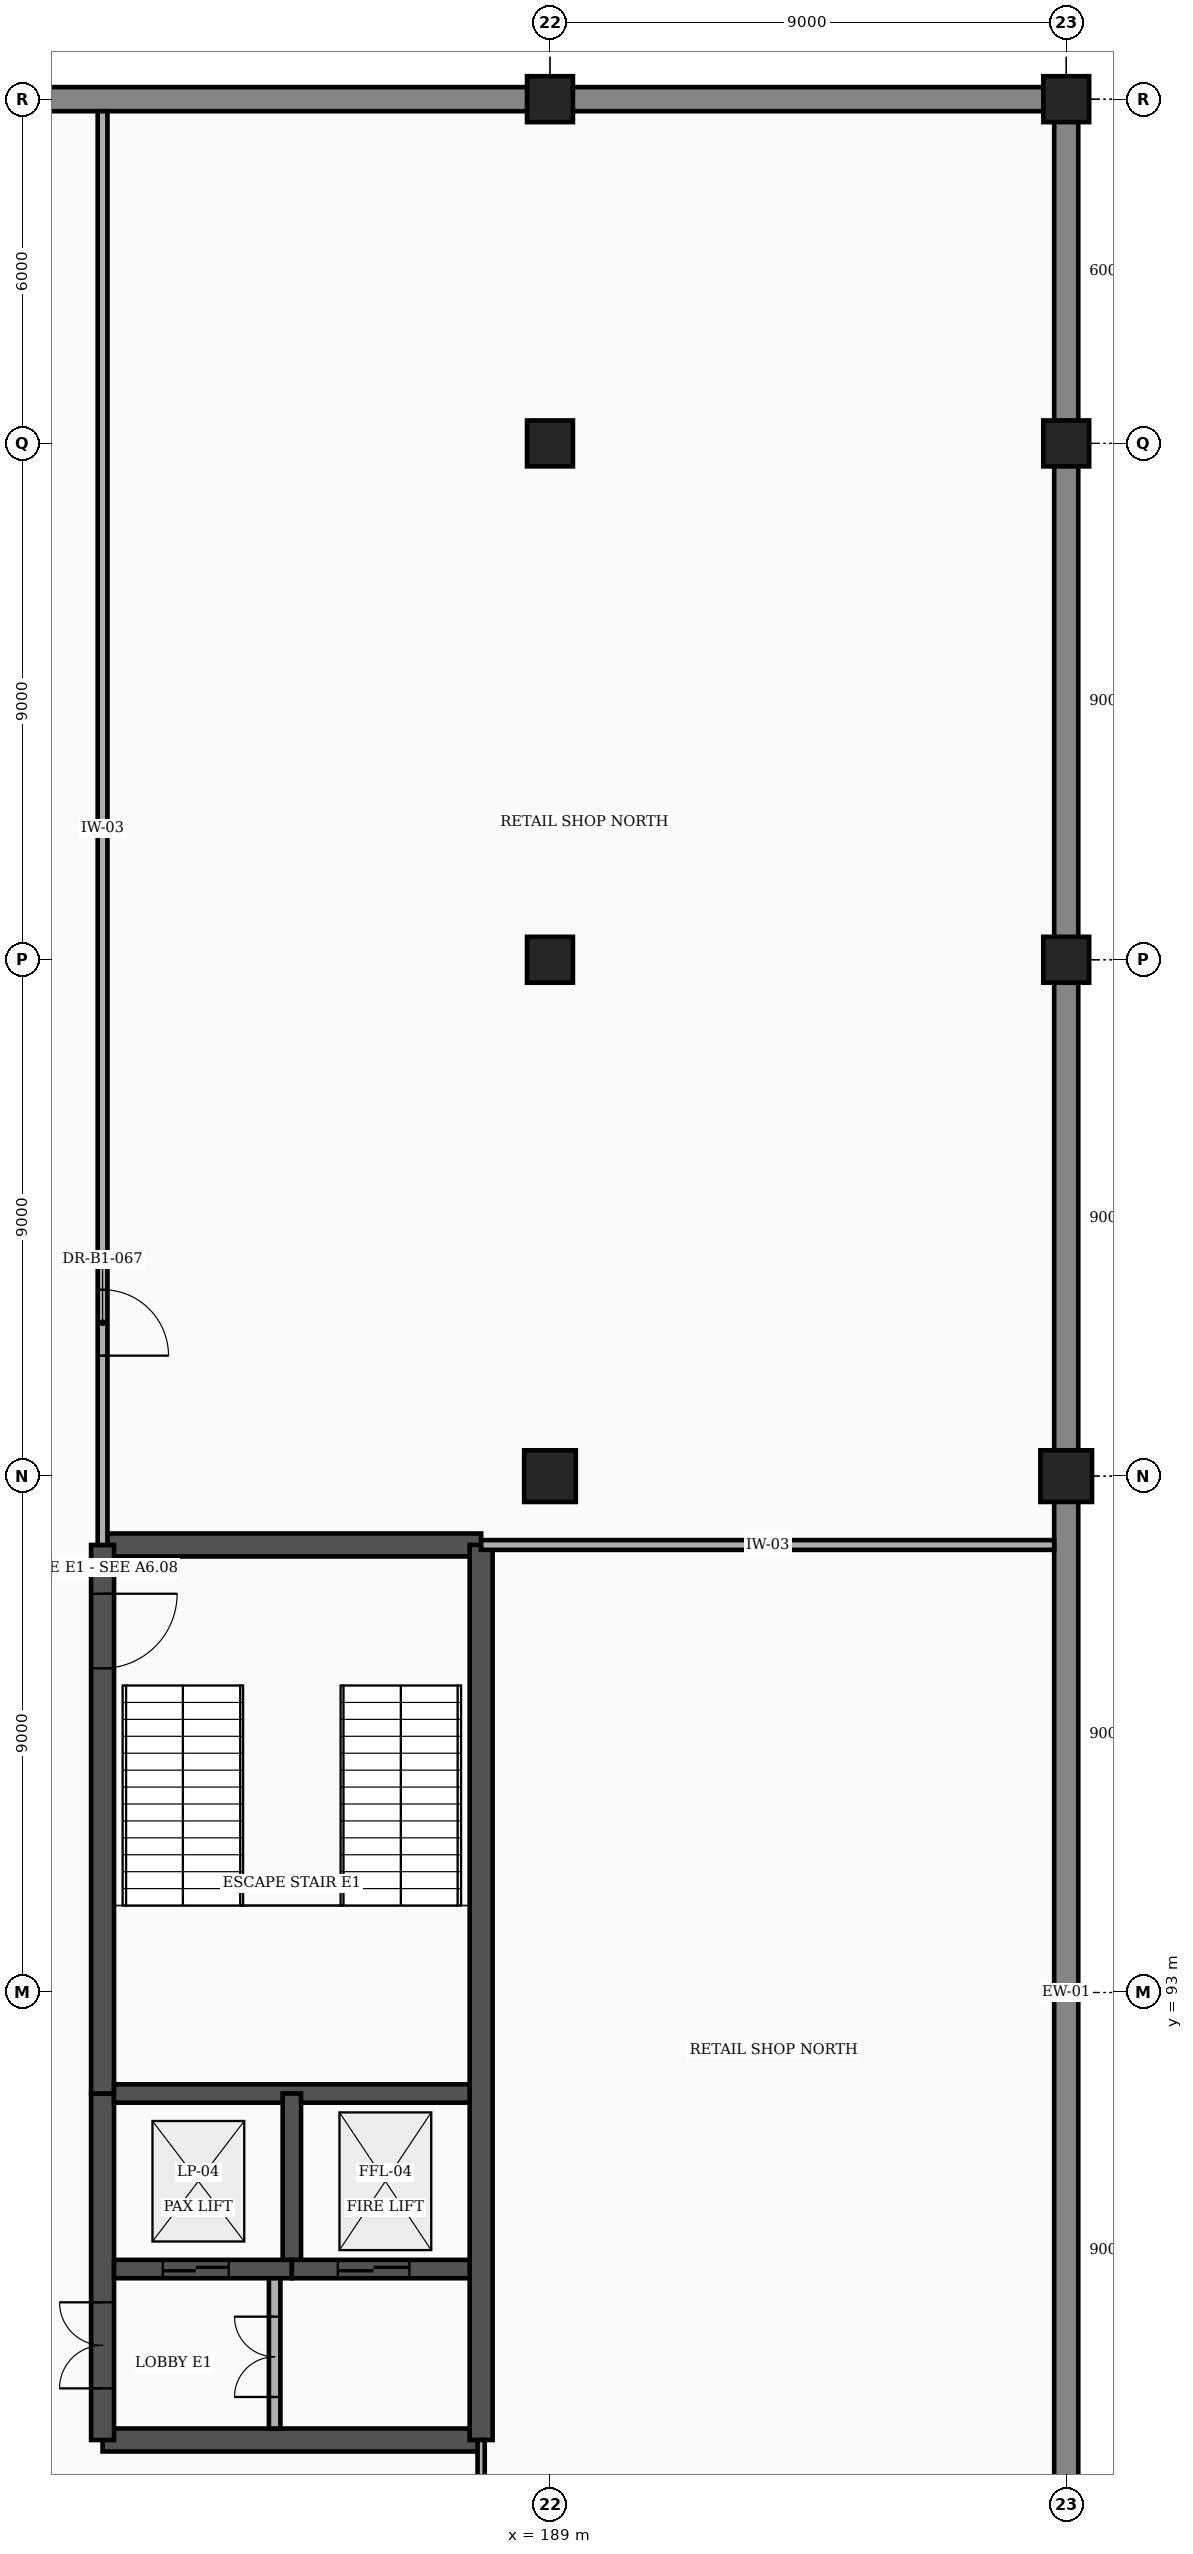
"""IFC4 building model, lengths in metres.
Left out: names, types, materials, properties, quantities, classifications, styles, units other than length and angle.
Written with IfcOpenShell. Run it as: python <this file> out.ifc"""

import sys

from ifc_helpers import new_model, si_unit, direction, frame, frame_2d, origin, origin_2d, place, context, subcontext, project, spatial, rectangle, extrude, element, fill, save


model = new_model("IFC4")
c1 = context("Model", 3, precision=1e-05, world=origin(), true_north=direction((0.0, 1.0)))
c2 = subcontext(c1, "Body", "Model", "MODEL_VIEW")
j1 = project(units=[si_unit("LENGTHUNIT", "METRE"), si_unit("PLANEANGLEUNIT", "RADIAN")], contexts=[c1])
p1 = place(None, origin())
s1 = spatial("IfcSite", under=j1, at=p1, CompositionType="ELEMENT")
p2 = place(p1, origin())
s2 = spatial("IfcBuilding", under=s1, at=p2, CompositionType="ELEMENT")
p3 = place(p2, frame((0.0, 0.0, -4.5)))
s3 = spatial("IfcBuildingStorey", under=s2, at=p3, CompositionType="ELEMENT", Elevation=-4.5)
p4 = place(p3, frame((189.0, 102.0, -0.45), z_axis=(0.0, 0.0, 1.0), x_axis=(1.0, 0.0, 0.0)))
e1 = element("IfcColumn", 1, at=p4, inside=s3, PredefinedType="COLUMN", context=c2, shape_type="SweptSolid", body=[
    extrude(rectangle(XDim=0.9, YDim=0.9, at=origin_2d()), origin(), (0.0, 0.0, 1.0), 4.95),
])
for number, where, z_axis, x_axis in (
    (2, (189.0, 111.0, -0.45), (0.0, 0.0, 1.0), (1.0, 0.0, 0.0)),
    (3, (189.0, 120.0, -0.45), (0.0, 0.0, 1.0), (1.0, 0.0, 0.0)),
    (4, (189.0, 126.0, -0.45), (0.0, 0.0, 1.0), (1.0, 0.0, 0.0)),
):
    element("IfcColumn", number, at=place(p3, frame(where, z_axis=z_axis, x_axis=x_axis)), inside=s3, PredefinedType="COLUMN", context=c2, shape_type="SweptSolid", body=[
        extrude(rectangle(XDim=0.8, YDim=0.8, at=origin_2d()), origin(), (0.0, 0.0, 1.0), 4.95),
    ])
p5 = place(p3, frame((198.0, 102.0, -0.45), z_axis=(0.0, 0.0, 1.0), x_axis=(1.0, 0.0, 0.0)))
e5 = element("IfcColumn", 5, at=p5, inside=s3, PredefinedType="COLUMN", context=c2, shape_type="SweptSolid", body=[
    extrude(rectangle(XDim=0.9, YDim=0.9, at=origin_2d()), origin(), (0.0, 0.0, 1.0), 4.95),
])
for number, where, z_axis, x_axis in (
    (6, (198.0, 111.0, -0.45), (0.0, 0.0, 1.0), (1.0, 0.0, 0.0)),
    (7, (198.0, 120.0, -0.45), (0.0, 0.0, 1.0), (1.0, 0.0, 0.0)),
    (8, (198.0, 126.0, -0.45), (0.0, 0.0, 1.0), (1.0, 0.0, 0.0)),
):
    element("IfcColumn", number, at=place(p3, frame(where, z_axis=z_axis, x_axis=x_axis)), inside=s3, PredefinedType="COLUMN", context=c2, shape_type="SweptSolid", body=[
        extrude(rectangle(XDim=0.8, YDim=0.8, at=origin_2d()), origin(), (0.0, 0.0, 1.0), 4.95),
    ])
p6 = place(p3, frame((171.392, 126.0, 0.0), z_axis=(0.0, 0.0, 1.0), x_axis=(1.0, 0.0, 0.0)))
e9 = element("IfcWall", 9, at=p6, inside=s3, PredefinedType="STANDARD", context=c2, shape_type="SweptSolid", body=[
    extrude(rectangle(XDim=17.216, YDim=0.42, at=frame_2d((8.608, 0.0))), origin(), (0.0, 0.0, 1.0), 3.7),
])
p7 = place(p3, frame((189.392, 126.0, 0.0), z_axis=(0.0, 0.0, 1.0), x_axis=(1.0, 0.0, 0.0)))
e10 = element("IfcWall", 10, at=p7, inside=s3, PredefinedType="STANDARD", context=c2, shape_type="SweptSolid", body=[
    extrude(rectangle(XDim=8.216, YDim=0.42, at=frame_2d((4.108, 0.0))), origin(), (0.0, 0.0, 1.0), 3.7),
])
p8 = place(p3, frame((198.0, 84.442, 0.0), z_axis=(0.0, 0.0, 1.0), x_axis=(0.0, 1.0, 0.0)))
e11 = element("IfcWall", 11, at=p8, inside=s3, PredefinedType="STANDARD", context=c2, shape_type="SweptSolid", body=[
    extrude(rectangle(XDim=17.116, YDim=0.42, at=frame_2d((8.558, 0.0))), origin(), (0.0, 0.0, 1.0), 3.7),
])
p9 = place(p3, frame((198.0, 102.442, 0.0), z_axis=(0.0, 0.0, 1.0), x_axis=(0.0, 1.0, 0.0)))
e12 = element("IfcWall", 12, at=p9, inside=s3, PredefinedType="STANDARD", context=c2, shape_type="SweptSolid", body=[
    extrude(rectangle(XDim=8.166, YDim=0.42, at=frame_2d((4.083, 0.0))), origin(), (0.0, 0.0, 1.0), 3.7),
])
p10 = place(p3, frame((198.0, 111.392, 0.0), z_axis=(0.0, 0.0, 1.0), x_axis=(0.0, 1.0, 0.0)))
e13 = element("IfcWall", 13, at=p10, inside=s3, PredefinedType="STANDARD", context=c2, shape_type="SweptSolid", body=[
    extrude(rectangle(XDim=8.216, YDim=0.42, at=frame_2d((4.108, 0.0))), origin(), (0.0, 0.0, 1.0), 3.7),
])
p11 = place(p3, frame((198.0, 120.392, 0.0), z_axis=(0.0, 0.0, 1.0), x_axis=(0.0, 1.0, 0.0)))
e14 = element("IfcWall", 14, at=p11, inside=s3, PredefinedType="STANDARD", context=c2, shape_type="SweptSolid", body=[
    extrude(rectangle(XDim=5.216, YDim=0.42, at=frame_2d((2.608, 0.0))), origin(), (0.0, 0.0, 1.0), 3.7),
])
for number, where, z_axis, x_axis in (
    (15, (181.2, 85.2, 0.0), (0.0, 0.0, 1.0), (1.0, 0.0, 0.0)),
    (16, (181.2, 100.8, 0.0), (0.0, 0.0, 1.0), (1.0, 0.0, 0.0)),
):
    element("IfcWall", number, at=place(p3, frame(where, z_axis=z_axis, x_axis=x_axis)), inside=s3, PredefinedType="SHEAR", context=c2, shape_type="SweptSolid", body=[
        extrude(rectangle(XDim=6.6, YDim=0.4, at=frame_2d((3.3, 0.0))), origin(), (0.0, 0.0, 1.0), 4.24),
    ])
p12 = place(p3, frame((187.8, 85.2, 0.0), z_axis=(0.0, 0.0, 1.0), x_axis=(0.0, 1.0, 0.0)))
e17 = element("IfcWall", 17, at=p12, inside=s3, PredefinedType="SHEAR", context=c2, shape_type="SweptSolid", body=[
    extrude(rectangle(XDim=15.6, YDim=0.4, at=frame_2d((7.8, 0.0))), origin(), (0.0, 0.0, 1.0), 4.24),
])
p13 = place(p3, frame((181.2, 85.2, 0.0), z_axis=(0.0, 0.0, 1.0), x_axis=(0.0, 1.0, 0.0)))
e18 = element("IfcWall", 18, at=p13, inside=s3, PredefinedType="SHEAR", context=c2, shape_type="SweptSolid", body=[
    extrude(rectangle(XDim=6.04, YDim=0.4, at=frame_2d((3.02, 0.0))), origin(), (0.0, 0.0, 1.0), 4.24),
])
p14 = place(p13, frame((0.9, 0.0, 0.0)))
e19 = element("IfcOpeningElement", 19, at=p14, cuts=e18, PredefinedType="OPENING", context=c2, shape_type="SweptSolid", body=[
    extrude(rectangle(XDim=1.5, YDim=2.2, at=frame_2d((0.75, 1.1))), frame((0.0, 0.212, 0.0), z_axis=(0.0, -1.0, 0.0), x_axis=(1.0, 0.0, 0.0)), (0.0, 0.0, 1.0), 0.424),
])
p15 = place(p3, frame((181.2, 91.24, 0.0), z_axis=(0.0, 0.0, 1.0), x_axis=(0.0, 1.0, 0.0)))
e20 = element("IfcWall", 20, at=p15, inside=s3, PredefinedType="SHEAR", context=c2, shape_type="SweptSolid", body=[
    extrude(rectangle(XDim=9.56, YDim=0.4, at=frame_2d((4.78, 0.0))), origin(), (0.0, 0.0, 1.0), 4.24),
])
p16 = place(p15, frame((7.41, 0.0, 0.0)))
e21 = element("IfcOpeningElement", 21, at=p16, cuts=e20, PredefinedType="OPENING", context=c2, shape_type="SweptSolid", body=[
    extrude(rectangle(XDim=1.3, YDim=2.2, at=frame_2d((0.65, 1.1))), frame((0.0, 0.212, 0.0), z_axis=(0.0, -1.0, 0.0), x_axis=(1.0, 0.0, 0.0)), (0.0, 0.0, 1.0), 0.424),
])
p17 = place(p3, frame((181.4, 91.24, 0.0), z_axis=(0.0, 0.0, 1.0), x_axis=(1.0, 0.0, 0.0)))
e22 = element("IfcWall", 22, at=p17, inside=s3, PredefinedType="SHEAR", context=c2, shape_type="SweptSolid", body=[
    extrude(rectangle(XDim=6.2, YDim=0.32, at=frame_2d((3.1, 0.0))), origin(), (0.0, 0.0, 1.0), 4.24),
])
p18 = place(p3, frame((184.5, 88.18, 0.0), z_axis=(0.0, 0.0, 1.0), x_axis=(0.0, 1.0, 0.0)))
e23 = element("IfcWall", 23, at=p18, inside=s3, PredefinedType="SHEAR", context=c2, shape_type="SweptSolid", body=[
    extrude(rectangle(XDim=3.06, YDim=0.32, at=frame_2d((1.53, 0.0))), origin(), (0.0, 0.0, 1.0), 4.24),
])
p19 = place(p3, frame((184.2, 85.4, 0.0), z_axis=(0.0, 0.0, 1.0), x_axis=(0.0, 1.0, 0.0)))
e24 = element("IfcWall", 24, at=p19, inside=s3, PredefinedType="PARTITIONING", context=c2, shape_type="SweptSolid", body=[
    extrude(rectangle(XDim=2.78, YDim=0.2, at=frame_2d((1.39, 0.0))), origin(), (0.0, 0.0, 1.0), 4.24),
])
p20 = place(p19, frame((0.55, 0.0, 0.0)))
e25 = element("IfcOpeningElement", 25, at=p20, cuts=e24, PredefinedType="OPENING", context=c2, shape_type="SweptSolid", body=[
    extrude(rectangle(XDim=1.4, YDim=2.25, at=frame_2d((0.7, 1.125))), frame((0.0, 0.112, 0.0), z_axis=(0.0, -1.0, 0.0), x_axis=(1.0, 0.0, 0.0)), (0.0, 0.0, 1.0), 0.224),
])
p21 = place(p3, frame((181.4, 88.18, 0.0), z_axis=(0.0, 0.0, 1.0), x_axis=(1.0, 0.0, 0.0)))
e26 = element("IfcWall", 26, at=p21, inside=s3, PredefinedType="SHEAR", context=c2, shape_type="SweptSolid", body=[
    extrude(rectangle(XDim=3.1, YDim=0.32, at=frame_2d((1.55, 0.0))), origin(), (0.0, 0.0, 1.0), 4.24),
])
p22 = place(p21, frame((0.85, 0.0, 0.0)))
e27 = element("IfcOpeningElement", 27, at=p22, cuts=e26, PredefinedType="OPENING", context=c2, shape_type="SweptSolid", body=[
    extrude(rectangle(XDim=1.15, YDim=2.2, at=frame_2d((0.575, 1.1))), frame((0.0, 0.172, 0.0), z_axis=(0.0, -1.0, 0.0), x_axis=(1.0, 0.0, 0.0)), (0.0, 0.0, 1.0), 0.344),
])
p23 = place(p3, frame((184.5, 88.18, 0.0), z_axis=(0.0, 0.0, 1.0), x_axis=(1.0, 0.0, 0.0)))
e28 = element("IfcWall", 28, at=p23, inside=s3, PredefinedType="SHEAR", context=c2, shape_type="SweptSolid", body=[
    extrude(rectangle(XDim=3.1, YDim=0.32, at=frame_2d((1.55, 0.0))), origin(), (0.0, 0.0, 1.0), 4.24),
])
p24 = place(p23, frame((0.8, 0.0, 0.0)))
e29 = element("IfcOpeningElement", 29, at=p24, cuts=e28, PredefinedType="OPENING", context=c2, shape_type="SweptSolid", body=[
    extrude(rectangle(XDim=1.25, YDim=2.25, at=frame_2d((0.625, 1.125))), frame((0.0, 0.172, 0.0), z_axis=(0.0, -1.0, 0.0), x_axis=(1.0, 0.0, 0.0)), (0.0, 0.0, 1.0), 0.344),
])
p25 = place(p3, frame((187.8, 83.2, 0.0), z_axis=(0.0, 0.0, 1.0), x_axis=(0.0, 1.0, 0.0)))
e30 = element("IfcWall", 30, at=p25, inside=s3, PredefinedType="PARTITIONING", context=c2, shape_type="SweptSolid", body=[
    extrude(rectangle(XDim=2.0, YDim=0.125, at=frame_2d((1.0, 0.0))), origin(), (0.0, 0.0, 1.0), 4.24),
])
p26 = place(p3, frame((187.8, 100.8, 0.0), z_axis=(0.0, 0.0, 1.0), x_axis=(1.0, 0.0, 0.0)))
e31 = element("IfcWall", 31, at=p26, inside=s3, PredefinedType="PARTITIONING", context=c2, shape_type="SweptSolid", body=[
    extrude(rectangle(XDim=9.99, YDim=0.17, at=frame_2d((4.995, 0.0))), origin(), (0.0, 0.0, 1.0), 4.24),
])
p27 = place(p3, frame((181.2, 100.8, 0.0), z_axis=(0.0, 0.0, 1.0), x_axis=(0.0, 1.0, 0.0)))
e32 = element("IfcWall", 32, at=p27, inside=s3, PredefinedType="PARTITIONING", context=c2, shape_type="SweptSolid", body=[
    extrude(rectangle(XDim=24.99, YDim=0.17, at=frame_2d((12.495, 0.0))), origin(), (0.0, 0.0, 1.0), 4.24),
])
p28 = place(p27, frame((3.3, 0.0, 0.0)))
e33 = element("IfcOpeningElement", 33, at=p28, cuts=e32, PredefinedType="OPENING", context=c2, shape_type="SweptSolid", body=[
    extrude(rectangle(XDim=1.15, YDim=2.15, at=frame_2d((0.575, 1.075))), frame((0.0, 0.097, 0.0), z_axis=(0.0, -1.0, 0.0), x_axis=(1.0, 0.0, 0.0)), (0.0, 0.0, 1.0), 0.194),
])
p29 = place(p14, origin())
e34 = element("IfcDoor", 34, at=p29, inside=s3, OperationType="DOUBLE_DOOR_SINGLE_SWING", PredefinedType="DOOR", context=c2, shape_type="SweptSolid", body=[
    extrude(rectangle(XDim=1.5, YDim=2.2, at=frame_2d((0.75, 1.1))), frame((0.0, 0.025, 0.0), z_axis=(0.0, -1.0, 0.0), x_axis=(1.0, 0.0, 0.0)), (0.0, 0.0, 1.0), 0.05),
])
fill(e19, e34)
p30 = place(p16, frame((1.3, 0.0, 0.0), z_axis=(0.0, 0.0, 1.0), x_axis=(-1.0, 0.0, 0.0)))
e35 = element("IfcDoor", 35, at=p30, inside=s3, OperationType="SINGLE_SWING_LEFT", PredefinedType="DOOR", context=c2, shape_type="SweptSolid", body=[
    extrude(rectangle(XDim=1.3, YDim=2.2, at=frame_2d((0.65, 1.1))), frame((0.0, 0.025, 0.0), z_axis=(0.0, -1.0, 0.0), x_axis=(1.0, 0.0, 0.0)), (0.0, 0.0, 1.0), 0.05),
])
fill(e21, e35)
p31 = place(p20, origin())
e36 = element("IfcDoor", 36, at=p31, inside=s3, OperationType="DOUBLE_DOOR_SINGLE_SWING", PredefinedType="DOOR", context=c2, shape_type="SweptSolid", body=[
    extrude(rectangle(XDim=1.4, YDim=2.25, at=frame_2d((0.7, 1.125))), frame((0.0, 0.025, 0.0), z_axis=(0.0, -1.0, 0.0), x_axis=(1.0, 0.0, 0.0)), (0.0, 0.0, 1.0), 0.05),
])
fill(e25, e36)
p32 = place(p22, origin())
e37 = element("IfcDoor", 37, at=p32, inside=s3, OperationType="DOUBLE_DOOR_SLIDING", PredefinedType="DOOR", context=c2, shape_type="SweptSolid", body=[
    extrude(rectangle(XDim=1.15, YDim=2.2, at=frame_2d((0.575, 1.1))), frame((0.0, 0.025, 0.0), z_axis=(0.0, -1.0, 0.0), x_axis=(1.0, 0.0, 0.0)), (0.0, 0.0, 1.0), 0.05),
])
fill(e27, e37)
p33 = place(p24, origin())
e38 = element("IfcDoor", 38, at=p33, inside=s3, OperationType="DOUBLE_DOOR_SLIDING", PredefinedType="DOOR", context=c2, shape_type="SweptSolid", body=[
    extrude(rectangle(XDim=1.25, YDim=2.25, at=frame_2d((0.625, 1.125))), frame((0.0, 0.025, 0.0), z_axis=(0.0, -1.0, 0.0), x_axis=(1.0, 0.0, 0.0)), (0.0, 0.0, 1.0), 0.05),
])
fill(e29, e38)
p34 = place(p28, frame((1.15, 0.0, 0.0), z_axis=(0.0, 0.0, 1.0), x_axis=(-1.0, 0.0, 0.0)))
e39 = element("IfcDoor", 39, at=p34, inside=s3, OperationType="SINGLE_SWING_RIGHT", PredefinedType="DOOR", context=c2, shape_type="SweptSolid", body=[
    extrude(rectangle(XDim=1.15, YDim=2.15, at=frame_2d((0.575, 1.075))), frame((0.0, 0.025, 0.0), z_axis=(0.0, -1.0, 0.0), x_axis=(1.0, 0.0, 0.0)), (0.0, 0.0, 1.0), 0.05),
])
fill(e33, e39)
save(model, sys.argv[1])
